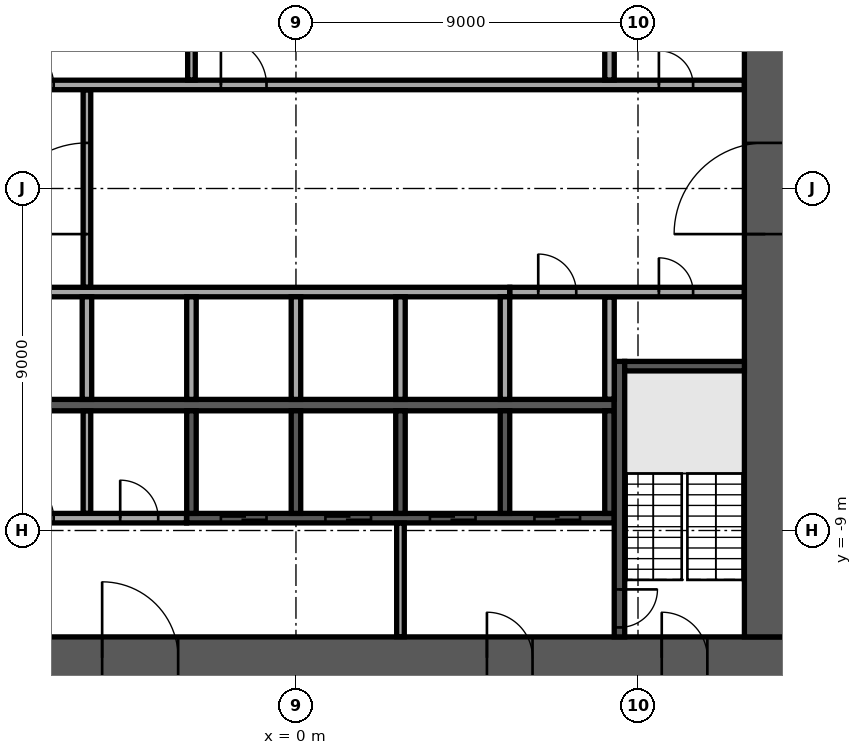
"""IFC4 building model, lengths in metres.
Left out: names, types, materials, properties, quantities, classifications, styles, units other than length and angle.
Written with IfcOpenShell. Run it as: python <this file> out.ifc"""

import sys

from ifc_helpers import new_model, si_unit, direction, frame, frame_2d, origin, place, context, subcontext, project, spatial, rectangle, extrude, element, fill, save


model = new_model("IFC4")
c1 = context("Model", 3, precision=1e-05, world=origin(), true_north=direction((0.0, 1.0)))
c2 = subcontext(c1, "Body", "Model", "MODEL_VIEW")
j1 = project(units=[si_unit("LENGTHUNIT", "METRE"), si_unit("PLANEANGLEUNIT", "RADIAN")], contexts=[c1])
p1 = place(None, origin())
s1 = spatial("IfcSite", under=j1, at=p1, CompositionType="ELEMENT")
p2 = place(p1, origin())
s2 = spatial("IfcBuilding", under=s1, at=p2, CompositionType="ELEMENT")
p3 = place(p2, frame((0.0, 0.0, 82.1)))
s3 = spatial("IfcBuildingStorey", under=s2, at=p3, CompositionType="ELEMENT", Elevation=82.1)
p4 = place(p3, frame((-12.9, -12.35, 0.0), z_axis=(0.0, 0.0, 1.0), x_axis=(1.0, 0.0, 0.0)))
e1 = element("IfcWall", 1, at=p4, inside=s3, PredefinedType="SHEAR", context=c2, shape_type="SweptSolid", body=[
    extrude(rectangle(XDim=25.8, YDim=1.1, at=frame_2d((12.9, 0.0))), origin(), (0.0, 0.0, 1.0), 3.58),
])
p5 = place(p4, frame((7.8, 0.0, 0.0)))
e2 = element("IfcOpeningElement", 2, at=p5, cuts=e1, PredefinedType="OPENING", context=c2, shape_type="SweptSolid", body=[
    extrude(rectangle(XDim=2.0, YDim=2.1, at=frame_2d((1.0, 1.05))), frame((0.0, 0.56, 0.0), z_axis=(0.0, -1.0, 0.0), x_axis=(1.0, 0.0, 0.0)), (0.0, 0.0, 1.0), 1.12),
])
p6 = place(p4, frame((17.925, 0.0, 0.0)))
e3 = element("IfcOpeningElement", 3, at=p6, cuts=e1, PredefinedType="OPENING", context=c2, shape_type="SweptSolid", body=[
    extrude(rectangle(XDim=1.2, YDim=2.1, at=frame_2d((0.6, 1.05))), frame((0.0, 0.56, 0.0), z_axis=(0.0, -1.0, 0.0), x_axis=(1.0, 0.0, 0.0)), (0.0, 0.0, 1.0), 1.12),
])
p7 = place(p4, frame((2.075, 0.0, 0.0)))
e4 = element("IfcOpeningElement", 4, at=p7, cuts=e1, PredefinedType="OPENING", context=c2, shape_type="SweptSolid", body=[
    extrude(rectangle(XDim=1.2, YDim=2.1, at=frame_2d((0.6, 1.05))), frame((0.0, 0.56, 0.0), z_axis=(0.0, -1.0, 0.0), x_axis=(1.0, 0.0, 0.0)), (0.0, 0.0, 1.0), 1.12),
])
p8 = place(p4, frame((22.525, 0.0, 0.0)))
e5 = element("IfcOpeningElement", 5, at=p8, cuts=e1, PredefinedType="OPENING", context=c2, shape_type="SweptSolid", body=[
    extrude(rectangle(XDim=1.2, YDim=2.1, at=frame_2d((0.6, 1.05))), frame((0.0, 0.56, 0.0), z_axis=(0.0, -1.0, 0.0), x_axis=(1.0, 0.0, 0.0)), (0.0, 0.0, 1.0), 1.12),
])
p9 = place(p3, frame((12.35, -11.8, 0.0), z_axis=(0.0, 0.0, 1.0), x_axis=(0.0, 1.0, 0.0)))
e6 = element("IfcWall", 6, at=p9, inside=s3, PredefinedType="SHEAR", context=c2, shape_type="SweptSolid", body=[
    extrude(rectangle(XDim=23.6, YDim=1.1, at=frame_2d((11.8, 0.0))), origin(), (0.0, 0.0, 1.0), 3.58),
])
p10 = place(p9, frame((10.6, 0.0, 0.0)))
e7 = element("IfcOpeningElement", 7, at=p10, cuts=e6, PredefinedType="OPENING", context=c2, shape_type="SweptSolid", body=[
    extrude(rectangle(XDim=2.4, YDim=2.4, at=frame_2d((1.2, 1.2))), frame((0.0, 0.56, 0.0), z_axis=(0.0, -1.0, 0.0), x_axis=(1.0, 0.0, 0.0)), (0.0, 0.0, 1.0), 1.12),
])
p11 = place(p3, frame((-8.375, -5.7, 0.0), z_axis=(0.0, 0.0, 1.0), x_axis=(1.0, 0.0, 0.0)))
e8 = element("IfcWall", 8, at=p11, inside=s3, PredefinedType="SOLIDWALL", context=c2, shape_type="SweptSolid", body=[
    extrude(rectangle(XDim=16.75, YDim=0.3, at=frame_2d((8.375, 0.0))), origin(), (0.0, 0.0, 1.0), 3.58),
])
p12 = place(p3, frame((-8.375, -2.725, 0.0), z_axis=(0.0, 0.0, 1.0), x_axis=(1.0, 0.0, 0.0)))
e9 = element("IfcWall", 9, at=p12, inside=s3, PredefinedType="SOLIDWALL", context=c2, shape_type="SweptSolid", body=[
    extrude(rectangle(XDim=14.0, YDim=0.25, at=frame_2d((7.0, 0.0))), origin(), (0.0, 0.0, 1.0), 3.58),
])
for number, where, z_axis, x_axis in (
    (10, (-5.5, -5.55, 0.0), (0.0, 0.0, 1.0), (0.0, 1.0, 0.0)),
    (11, (-2.75, -5.55, 0.0), (0.0, 0.0, 1.0), (0.0, 1.0, 0.0)),
    (12, (0.0, -5.55, 0.0), (0.0, 0.0, 1.0), (0.0, 1.0, 0.0)),
    (13, (2.75, -5.55, 0.0), (0.0, 0.0, 1.0), (0.0, 1.0, 0.0)),
    (14, (5.5, -5.55, 0.0), (0.0, 0.0, 1.0), (0.0, 1.0, 0.0)),
):
    element("IfcWall", number, at=place(p3, frame(where, z_axis=z_axis, x_axis=x_axis)), inside=s3, PredefinedType="SOLIDWALL", context=c2, shape_type="SweptSolid", body=[
        extrude(rectangle(XDim=2.7, YDim=0.25, at=frame_2d((1.35, 0.0))), origin(), (0.0, 0.0, 1.0), 3.58),
    ])
p13 = place(p3, frame((-2.875, -8.675, 0.0), z_axis=(0.0, 0.0, 1.0), x_axis=(1.0, 0.0, 0.0)))
e15 = element("IfcWall", 15, at=p13, inside=s3, PredefinedType="SOLIDWALL", context=c2, shape_type="SweptSolid", body=[
    extrude(rectangle(XDim=11.25, YDim=0.25, at=frame_2d((5.625, 0.0))), origin(), (0.0, 0.0, 1.0), 3.58),
])
p14 = place(p13, frame((0.9, 0.0, 0.0)))
e16 = element("IfcOpeningElement", 16, at=p14, cuts=e15, PredefinedType="OPENING", context=c2, shape_type="SweptSolid", body=[
    extrude(rectangle(XDim=1.2, YDim=2.1, at=frame_2d((0.6, 1.05))), frame((0.0, 0.135, 0.0), z_axis=(0.0, -1.0, 0.0), x_axis=(1.0, 0.0, 0.0)), (0.0, 0.0, 1.0), 0.27),
])
p15 = place(p13, frame((3.65, 0.0, 0.0)))
e17 = element("IfcOpeningElement", 17, at=p15, cuts=e15, PredefinedType="OPENING", context=c2, shape_type="SweptSolid", body=[
    extrude(rectangle(XDim=1.2, YDim=2.1, at=frame_2d((0.6, 1.05))), frame((0.0, 0.135, 0.0), z_axis=(0.0, -1.0, 0.0), x_axis=(1.0, 0.0, 0.0)), (0.0, 0.0, 1.0), 0.27),
])
p16 = place(p13, frame((6.4, 0.0, 0.0)))
e18 = element("IfcOpeningElement", 18, at=p16, cuts=e15, PredefinedType="OPENING", context=c2, shape_type="SweptSolid", body=[
    extrude(rectangle(XDim=1.2, YDim=2.1, at=frame_2d((0.6, 1.05))), frame((0.0, 0.135, 0.0), z_axis=(0.0, -1.0, 0.0), x_axis=(1.0, 0.0, 0.0)), (0.0, 0.0, 1.0), 0.27),
])
p17 = place(p13, frame((9.15, 0.0, 0.0)))
e19 = element("IfcOpeningElement", 19, at=p17, cuts=e15, PredefinedType="OPENING", context=c2, shape_type="SweptSolid", body=[
    extrude(rectangle(XDim=1.2, YDim=2.1, at=frame_2d((0.6, 1.05))), frame((0.0, 0.135, 0.0), z_axis=(0.0, -1.0, 0.0), x_axis=(1.0, 0.0, 0.0)), (0.0, 0.0, 1.0), 0.27),
])
for number, where, z_axis, x_axis in (
    (20, (-2.75, -8.55, 0.0), (0.0, 0.0, 1.0), (0.0, 1.0, 0.0)),
    (21, (0.0, -8.55, 0.0), (0.0, 0.0, 1.0), (0.0, 1.0, 0.0)),
    (22, (2.75, -8.55, 0.0), (0.0, 0.0, 1.0), (0.0, 1.0, 0.0)),
    (23, (5.5, -8.55, 0.0), (0.0, 0.0, 1.0), (0.0, 1.0, 0.0)),
    (24, (8.25, -8.55, 0.0), (0.0, 0.0, 1.0), (0.0, 1.0, 0.0)),
):
    element("IfcWall", number, at=place(p3, frame(where, z_axis=z_axis, x_axis=x_axis)), inside=s3, PredefinedType="SOLIDWALL", context=c2, shape_type="SweptSolid", body=[
        extrude(rectangle(XDim=2.7, YDim=0.25, at=frame_2d((1.35, 0.0))), origin(), (0.0, 0.0, 1.0), 3.58),
    ])
p18 = place(p3, frame((8.512, -4.55, 0.0), z_axis=(0.0, 0.0, 1.0), x_axis=(0.0, -1.0, 0.0)))
e25 = element("IfcWall", 25, at=p18, inside=s3, PredefinedType="SOLIDWALL", context=c2, shape_type="SweptSolid", body=[
    extrude(rectangle(XDim=7.25, YDim=0.275, at=frame_2d((3.625, 0.0))), origin(), (0.0, 0.0, 1.0), 3.58),
])
p19 = place(p18, frame((6.0, 0.0, 0.0)))
e26 = element("IfcOpeningElement", 26, at=p19, cuts=e25, PredefinedType="OPENING", context=c2, shape_type="SweptSolid", body=[
    extrude(rectangle(XDim=1.0, YDim=2.1, at=frame_2d((0.5, 1.05))), frame((0.0, 0.147, 0.0), z_axis=(0.0, -1.0, 0.0), x_axis=(1.0, 0.0, 0.0)), (0.0, 0.0, 1.0), 0.295),
])
p20 = place(p3, frame((8.65, -4.675, 0.0), z_axis=(0.0, 0.0, 1.0), x_axis=(1.0, 0.0, 0.0)))
e27 = element("IfcWall", 27, at=p20, inside=s3, PredefinedType="SOLIDWALL", context=c2, shape_type="SweptSolid", body=[
    extrude(rectangle(XDim=3.15, YDim=0.25, at=frame_2d((1.575, 0.0))), origin(), (0.0, 0.0, 1.0), 3.58),
])
p21 = place(p3, frame((2.75, -11.795, 0.0), z_axis=(0.0, 0.0, 1.0), x_axis=(0.0, 1.0, 0.0)))
e28 = element("IfcWall", 28, at=p21, inside=s3, PredefinedType="PARTITIONING", context=c2, shape_type="SweptSolid", body=[
    extrude(rectangle(XDim=2.99, YDim=0.2, at=frame_2d((1.495, 0.0))), origin(), (0.0, 0.0, 1.0), 3.58),
])
p22 = place(p3, frame((-8.37, -8.675, 0.0), z_axis=(0.0, 0.0, 1.0), x_axis=(1.0, 0.0, 0.0)))
e29 = element("IfcWall", 29, at=p22, inside=s3, PredefinedType="PARTITIONING", context=c2, shape_type="SweptSolid", body=[
    extrude(rectangle(XDim=5.49, YDim=0.25, at=frame_2d((2.745, 0.0))), origin(), (0.0, 0.0, 1.0), 3.58),
])
p23 = place(p22, frame((0.995, 0.0, 0.0)))
e30 = element("IfcOpeningElement", 30, at=p23, cuts=e29, PredefinedType="OPENING", context=c2, shape_type="SweptSolid", body=[
    extrude(rectangle(XDim=1.0, YDim=2.1, at=frame_2d((0.5, 1.05))), frame((0.0, 0.135, 0.0), z_axis=(0.0, -1.0, 0.0), x_axis=(1.0, 0.0, 0.0)), (0.0, 0.0, 1.0), 0.27),
])
p24 = place(p22, frame((3.745, 0.0, 0.0)))
e31 = element("IfcOpeningElement", 31, at=p24, cuts=e29, PredefinedType="OPENING", context=c2, shape_type="SweptSolid", body=[
    extrude(rectangle(XDim=1.0, YDim=2.1, at=frame_2d((0.5, 1.05))), frame((0.0, 0.135, 0.0), z_axis=(0.0, -1.0, 0.0), x_axis=(1.0, 0.0, 0.0)), (0.0, 0.0, 1.0), 0.27),
])
p25 = place(p3, frame((-5.5, -8.545, 0.0), z_axis=(0.0, 0.0, 1.0), x_axis=(0.0, 1.0, 0.0)))
e32 = element("IfcWall", 32, at=p25, inside=s3, PredefinedType="PARTITIONING", context=c2, shape_type="SweptSolid", body=[
    extrude(rectangle(XDim=2.69, YDim=0.2, at=frame_2d((1.345, 0.0))), origin(), (0.0, 0.0, 1.0), 3.58),
])
p26 = place(p3, frame((8.25, -5.545, 0.0), z_axis=(0.0, 0.0, 1.0), x_axis=(0.0, 1.0, 0.0)))
e33 = element("IfcWall", 33, at=p26, inside=s3, PredefinedType="PARTITIONING", context=c2, shape_type="SweptSolid", body=[
    extrude(rectangle(XDim=2.69, YDim=0.25, at=frame_2d((1.345, 0.0))), origin(), (0.0, 0.0, 1.0), 3.58),
])
p27 = place(p3, frame((5.63, -2.725, 0.0), z_axis=(0.0, 0.0, 1.0), x_axis=(1.0, 0.0, 0.0)))
e34 = element("IfcWall", 34, at=p27, inside=s3, PredefinedType="PARTITIONING", context=c2, shape_type="SweptSolid", body=[
    extrude(rectangle(XDim=6.165, YDim=0.25, at=frame_2d((3.083, 0.0))), origin(), (0.0, 0.0, 1.0), 3.58),
])
p28 = place(p27, frame((0.745, 0.0, 0.0)))
e35 = element("IfcOpeningElement", 35, at=p28, cuts=e34, PredefinedType="OPENING", context=c2, shape_type="SweptSolid", body=[
    extrude(rectangle(XDim=1.0, YDim=2.1, at=frame_2d((0.5, 1.05))), frame((0.0, 0.135, 0.0), z_axis=(0.0, -1.0, 0.0), x_axis=(1.0, 0.0, 0.0)), (0.0, 0.0, 1.0), 0.27),
])
p29 = place(p27, frame((3.92, 0.0, 0.0)))
e36 = element("IfcOpeningElement", 36, at=p29, cuts=e34, PredefinedType="OPENING", context=c2, shape_type="SweptSolid", body=[
    extrude(rectangle(XDim=0.9, YDim=2.1, at=frame_2d((0.45, 1.05))), frame((0.0, 0.135, 0.0), z_axis=(0.0, -1.0, 0.0), x_axis=(1.0, 0.0, 0.0)), (0.0, 0.0, 1.0), 0.27),
])
p30 = place(p3, frame((-5.5, -2.595, 0.0), z_axis=(0.0, 0.0, 1.0), x_axis=(0.0, 1.0, 0.0)))
e37 = element("IfcWall", 37, at=p30, inside=s3, PredefinedType="PARTITIONING", context=c2, shape_type="SweptSolid", body=[
    extrude(rectangle(XDim=5.19, YDim=0.2, at=frame_2d((2.595, 0.0))), origin(), (0.0, 0.0, 1.0), 3.58),
])
p31 = place(p30, frame((1.395, 0.0, 0.0)))
e38 = element("IfcOpeningElement", 38, at=p31, cuts=e37, PredefinedType="OPENING", context=c2, shape_type="SweptSolid", body=[
    extrude(rectangle(XDim=2.4, YDim=2.4, at=frame_2d((1.2, 1.2))), frame((0.0, 0.11, 0.0), z_axis=(0.0, -1.0, 0.0), x_axis=(1.0, 0.0, 0.0)), (0.0, 0.0, 1.0), 0.22),
])
p32 = place(p3, frame((-11.795, 2.725, 0.0), z_axis=(0.0, 0.0, 1.0), x_axis=(1.0, 0.0, 0.0)))
e39 = element("IfcWall", 39, at=p32, inside=s3, PredefinedType="PARTITIONING", context=c2, shape_type="SweptSolid", body=[
    extrude(rectangle(XDim=23.59, YDim=0.25, at=frame_2d((11.795, 0.0))), origin(), (0.0, 0.0, 1.0), 3.58),
])
p33 = place(p32, frame((21.345, 0.0, 0.0)))
e40 = element("IfcOpeningElement", 40, at=p33, cuts=e39, PredefinedType="OPENING", context=c2, shape_type="SweptSolid", body=[
    extrude(rectangle(XDim=0.9, YDim=2.1, at=frame_2d((0.45, 1.05))), frame((0.0, 0.135, 0.0), z_axis=(0.0, -1.0, 0.0), x_axis=(1.0, 0.0, 0.0)), (0.0, 0.0, 1.0), 0.27),
])
p34 = place(p32, frame((1.345, 0.0, 0.0)))
e41 = element("IfcOpeningElement", 41, at=p34, cuts=e39, PredefinedType="OPENING", context=c2, shape_type="SweptSolid", body=[
    extrude(rectangle(XDim=0.9, YDim=2.1, at=frame_2d((0.45, 1.05))), frame((0.0, 0.135, 0.0), z_axis=(0.0, -1.0, 0.0), x_axis=(1.0, 0.0, 0.0)), (0.0, 0.0, 1.0), 0.27),
])
p35 = place(p32, frame((4.42, 0.0, 0.0)))
e42 = element("IfcOpeningElement", 42, at=p35, cuts=e39, PredefinedType="OPENING", context=c2, shape_type="SweptSolid", body=[
    extrude(rectangle(XDim=1.0, YDim=2.1, at=frame_2d((0.5, 1.05))), frame((0.0, 0.135, 0.0), z_axis=(0.0, -1.0, 0.0), x_axis=(1.0, 0.0, 0.0)), (0.0, 0.0, 1.0), 0.27),
])
p36 = place(p32, frame((9.82, 0.0, 0.0)))
e43 = element("IfcOpeningElement", 43, at=p36, cuts=e39, PredefinedType="OPENING", context=c2, shape_type="SweptSolid", body=[
    extrude(rectangle(XDim=1.2, YDim=2.1, at=frame_2d((0.6, 1.05))), frame((0.0, 0.135, 0.0), z_axis=(0.0, -1.0, 0.0), x_axis=(1.0, 0.0, 0.0)), (0.0, 0.0, 1.0), 0.27),
])
p37 = place(p3, frame((-2.75, 2.855, 0.0), z_axis=(0.0, 0.0, 1.0), x_axis=(0.0, 1.0, 0.0)))
e44 = element("IfcWall", 44, at=p37, inside=s3, PredefinedType="PARTITIONING", context=c2, shape_type="SweptSolid", body=[
    extrude(rectangle(XDim=2.69, YDim=0.2, at=frame_2d((1.345, 0.0))), origin(), (0.0, 0.0, 1.0), 3.58),
])
p38 = place(p3, frame((8.25, 2.855, 0.0), z_axis=(0.0, 0.0, 1.0), x_axis=(0.0, 1.0, 0.0)))
e45 = element("IfcWall", 45, at=p38, inside=s3, PredefinedType="PARTITIONING", context=c2, shape_type="SweptSolid", body=[
    extrude(rectangle(XDim=2.69, YDim=0.25, at=frame_2d((1.345, 0.0))), origin(), (0.0, 0.0, 1.0), 3.58),
])
p39 = place(p5, origin())
e46 = element("IfcDoor", 46, at=p39, inside=s3, OperationType="SINGLE_SWING_LEFT", PredefinedType="DOOR", context=c2, shape_type="SweptSolid", body=[
    extrude(rectangle(XDim=2.0, YDim=2.1, at=frame_2d((1.0, 1.05))), frame((0.0, 0.025, 0.0), z_axis=(0.0, -1.0, 0.0), x_axis=(1.0, 0.0, 0.0)), (0.0, 0.0, 1.0), 0.05),
])
fill(e2, e46)
p40 = place(p6, origin())
e47 = element("IfcDoor", 47, at=p40, inside=s3, OperationType="SINGLE_SWING_LEFT", PredefinedType="DOOR", context=c2, shape_type="SweptSolid", body=[
    extrude(rectangle(XDim=1.2, YDim=2.1, at=frame_2d((0.6, 1.05))), frame((0.0, 0.025, 0.0), z_axis=(0.0, -1.0, 0.0), x_axis=(1.0, 0.0, 0.0)), (0.0, 0.0, 1.0), 0.05),
])
fill(e3, e47)
p41 = place(p8, origin())
e48 = element("IfcDoor", 48, at=p41, inside=s3, OperationType="SINGLE_SWING_LEFT", PredefinedType="DOOR", context=c2, shape_type="SweptSolid", body=[
    extrude(rectangle(XDim=1.2, YDim=2.1, at=frame_2d((0.6, 1.05))), frame((0.0, 0.025, 0.0), z_axis=(0.0, -1.0, 0.0), x_axis=(1.0, 0.0, 0.0)), (0.0, 0.0, 1.0), 0.05),
])
fill(e5, e48)
p42 = place(p10, origin())
e49 = element("IfcDoor", 49, at=p42, inside=s3, OperationType="SINGLE_SWING_LEFT", PredefinedType="DOOR", context=c2, shape_type="SweptSolid", body=[
    extrude(rectangle(XDim=2.4, YDim=2.4, at=frame_2d((1.2, 1.2))), frame((0.0, 0.025, 0.0), z_axis=(0.0, -1.0, 0.0), x_axis=(1.0, 0.0, 0.0)), (0.0, 0.0, 1.0), 0.05),
])
fill(e7, e49)
p43 = place(p14, origin())
e50 = element("IfcDoor", 50, at=p43, inside=s3, OperationType="DOUBLE_DOOR_SLIDING", PredefinedType="DOOR", context=c2, shape_type="SweptSolid", body=[
    extrude(rectangle(XDim=1.2, YDim=2.1, at=frame_2d((0.6, 1.05))), frame((0.0, 0.025, 0.0), z_axis=(0.0, -1.0, 0.0), x_axis=(1.0, 0.0, 0.0)), (0.0, 0.0, 1.0), 0.05),
])
fill(e16, e50)
p44 = place(p15, origin())
e51 = element("IfcDoor", 51, at=p44, inside=s3, OperationType="DOUBLE_DOOR_SLIDING", PredefinedType="DOOR", context=c2, shape_type="SweptSolid", body=[
    extrude(rectangle(XDim=1.2, YDim=2.1, at=frame_2d((0.6, 1.05))), frame((0.0, 0.025, 0.0), z_axis=(0.0, -1.0, 0.0), x_axis=(1.0, 0.0, 0.0)), (0.0, 0.0, 1.0), 0.05),
])
fill(e17, e51)
p45 = place(p16, origin())
e52 = element("IfcDoor", 52, at=p45, inside=s3, OperationType="DOUBLE_DOOR_SLIDING", PredefinedType="DOOR", context=c2, shape_type="SweptSolid", body=[
    extrude(rectangle(XDim=1.2, YDim=2.1, at=frame_2d((0.6, 1.05))), frame((0.0, 0.025, 0.0), z_axis=(0.0, -1.0, 0.0), x_axis=(1.0, 0.0, 0.0)), (0.0, 0.0, 1.0), 0.05),
])
fill(e18, e52)
p46 = place(p17, origin())
e53 = element("IfcDoor", 53, at=p46, inside=s3, OperationType="DOUBLE_DOOR_SLIDING", PredefinedType="DOOR", context=c2, shape_type="SweptSolid", body=[
    extrude(rectangle(XDim=1.2, YDim=2.1, at=frame_2d((0.6, 1.05))), frame((0.0, 0.025, 0.0), z_axis=(0.0, -1.0, 0.0), x_axis=(1.0, 0.0, 0.0)), (0.0, 0.0, 1.0), 0.05),
])
fill(e19, e53)
p47 = place(p19, origin())
e54 = element("IfcDoor", 54, at=p47, inside=s3, OperationType="SINGLE_SWING_LEFT", PredefinedType="DOOR", context=c2, shape_type="SweptSolid", body=[
    extrude(rectangle(XDim=1.0, YDim=2.1, at=frame_2d((0.5, 1.05))), frame((0.0, 0.025, 0.0), z_axis=(0.0, -1.0, 0.0), x_axis=(1.0, 0.0, 0.0)), (0.0, 0.0, 1.0), 0.05),
])
fill(e26, e54)
p48 = place(p23, origin())
e55 = element("IfcDoor", 55, at=p48, inside=s3, OperationType="SINGLE_SWING_LEFT", PredefinedType="DOOR", context=c2, shape_type="SweptSolid", body=[
    extrude(rectangle(XDim=1.0, YDim=2.1, at=frame_2d((0.5, 1.05))), frame((0.0, 0.025, 0.0), z_axis=(0.0, -1.0, 0.0), x_axis=(1.0, 0.0, 0.0)), (0.0, 0.0, 1.0), 0.05),
])
fill(e30, e55)
p49 = place(p24, origin())
e56 = element("IfcDoor", 56, at=p49, inside=s3, OperationType="SINGLE_SWING_LEFT", PredefinedType="DOOR", context=c2, shape_type="SweptSolid", body=[
    extrude(rectangle(XDim=1.0, YDim=2.1, at=frame_2d((0.5, 1.05))), frame((0.0, 0.025, 0.0), z_axis=(0.0, -1.0, 0.0), x_axis=(1.0, 0.0, 0.0)), (0.0, 0.0, 1.0), 0.05),
])
fill(e31, e56)
p50 = place(p28, origin())
e57 = element("IfcDoor", 57, at=p50, inside=s3, OperationType="SINGLE_SWING_LEFT", PredefinedType="DOOR", context=c2, shape_type="SweptSolid", body=[
    extrude(rectangle(XDim=1.0, YDim=2.1, at=frame_2d((0.5, 1.05))), frame((0.0, 0.025, 0.0), z_axis=(0.0, -1.0, 0.0), x_axis=(1.0, 0.0, 0.0)), (0.0, 0.0, 1.0), 0.05),
])
fill(e35, e57)
p51 = place(p33, origin())
e58 = element("IfcDoor", 58, at=p51, inside=s3, OperationType="SINGLE_SWING_LEFT", PredefinedType="DOOR", context=c2, shape_type="SweptSolid", body=[
    extrude(rectangle(XDim=0.9, YDim=2.1, at=frame_2d((0.45, 1.05))), frame((0.0, 0.025, 0.0), z_axis=(0.0, -1.0, 0.0), x_axis=(1.0, 0.0, 0.0)), (0.0, 0.0, 1.0), 0.05),
])
fill(e40, e58)
p52 = place(p29, origin())
e59 = element("IfcDoor", 59, at=p52, inside=s3, OperationType="SINGLE_SWING_LEFT", PredefinedType="DOOR", context=c2, shape_type="SweptSolid", body=[
    extrude(rectangle(XDim=0.9, YDim=2.1, at=frame_2d((0.45, 1.05))), frame((0.0, 0.025, 0.0), z_axis=(0.0, -1.0, 0.0), x_axis=(1.0, 0.0, 0.0)), (0.0, 0.0, 1.0), 0.05),
])
fill(e36, e59)
p53 = place(p35, origin())
e60 = element("IfcDoor", 60, at=p53, inside=s3, OperationType="SINGLE_SWING_LEFT", PredefinedType="DOOR", context=c2, shape_type="SweptSolid", body=[
    extrude(rectangle(XDim=1.0, YDim=2.1, at=frame_2d((0.5, 1.05))), frame((0.0, 0.025, 0.0), z_axis=(0.0, -1.0, 0.0), x_axis=(1.0, 0.0, 0.0)), (0.0, 0.0, 1.0), 0.05),
])
fill(e42, e60)
p54 = place(p36, origin())
e61 = element("IfcDoor", 61, at=p54, inside=s3, OperationType="SINGLE_SWING_LEFT", PredefinedType="DOOR", context=c2, shape_type="SweptSolid", body=[
    extrude(rectangle(XDim=1.2, YDim=2.1, at=frame_2d((0.6, 1.05))), frame((0.0, 0.025, 0.0), z_axis=(0.0, -1.0, 0.0), x_axis=(1.0, 0.0, 0.0)), (0.0, 0.0, 1.0), 0.05),
])
fill(e43, e61)
p55 = place(p31, origin())
e62 = element("IfcDoor", 62, at=p55, inside=s3, OperationType="SINGLE_SWING_LEFT", PredefinedType="DOOR", context=c2, shape_type="SweptSolid", body=[
    extrude(rectangle(XDim=2.4, YDim=2.4, at=frame_2d((1.2, 1.2))), frame((0.0, 0.025, 0.0), z_axis=(0.0, -1.0, 0.0), x_axis=(1.0, 0.0, 0.0)), (0.0, 0.0, 1.0), 0.05),
])
fill(e38, e62)
save(model, sys.argv[1])
